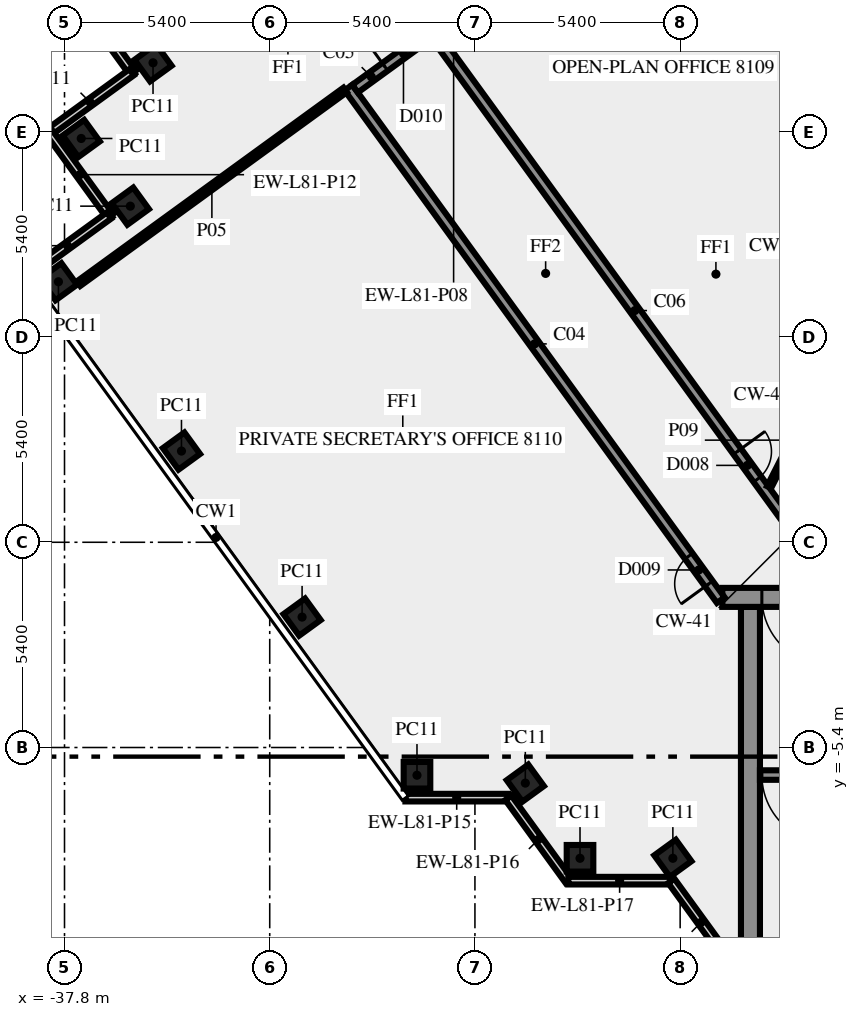
"""IFC4 building model, lengths in metres.
Left out: names, types, materials, properties, quantities, classifications, styles, units other than length and angle.
Written with IfcOpenShell. Run it as: python <this file> out.ifc"""

import sys

from ifc_helpers import new_model, si_unit, direction, frame, frame_2d, origin, origin_2d, place, context, subcontext, project, spatial, rectangle, extrude, element, fill, save


model = new_model("IFC4")
c1 = context("Model", 3, precision=1e-05, world=origin(), true_north=direction((0.0, 1.0)))
c2 = subcontext(c1, "Body", "Model", "MODEL_VIEW")
j1 = project(units=[si_unit("LENGTHUNIT", "METRE"), si_unit("PLANEANGLEUNIT", "RADIAN")], contexts=[c1])
p1 = place(None, origin())
s1 = spatial("IfcSite", under=j1, at=p1, CompositionType="ELEMENT")
p2 = place(p1, origin())
s2 = spatial("IfcBuilding", under=s1, at=p2, CompositionType="ELEMENT")
p3 = place(p2, frame((0.0, 0.0, 347.0)))
s3 = spatial("IfcBuildingStorey", under=s2, at=p3, CompositionType="ELEMENT", Elevation=347.0)
for number, where, z_axis, x_axis in (
    (1, (-35.471, 12.616, 0.0), (0.0, 0.0, 1.0), (-0.809, -0.588, 0.0)),
    (2, (-37.36, 10.625, 0.0), (0.0, 0.0, 1.0), (0.588, -0.809, 0.0)),
    (3, (-36.068, 8.844, 0.0), (0.0, 0.0, 1.0), (0.588, -0.809, 0.0)),
    (4, (-37.96, 6.855, 0.0), (0.0, 0.0, 1.0), (0.588, -0.809, 0.0)),
    (5, (-34.722, 2.4, 0.0), (0.0, 0.0, 1.0), (0.588, -0.809, 0.0)),
    (6, (-31.548, -1.969, 0.0), (0.0, 0.0, 1.0), (0.588, -0.809, 0.0)),
    (7, (-28.525, -6.13, 0.0), (0.0, 0.0, 1.0), (1.0, 0.0, 0.0)),
    (8, (-25.674, -6.337, 0.0), (0.0, 0.0, 1.0), (0.588, -0.809, 0.0)),
    (9, (-24.235, -8.315, 0.0), (0.0, 0.0, 1.0), (1.0, 0.0, 0.0)),
    (10, (-21.792, -8.315, 0.0), (0.0, 0.0, 1.0), (0.588, -0.809, 0.0)),
):
    element("IfcColumn", number, at=place(p3, frame(where, z_axis=z_axis, x_axis=x_axis)), inside=s3, PredefinedType="COLUMN", context=c2, shape_type="SweptSolid", body=[
        extrude(rectangle(XDim=0.7, YDim=0.7, at=origin_2d()), origin(), (0.0, 0.0, 1.0), 3.65),
    ])
for number, where, z_axis, x_axis in (
    (11, (-37.592, 14.536, 0.0), (0.0, 0.0, 1.0), (0.588, -0.809, 0.0)),
    (12, (-36.032, 12.369, 0.0), (0.0, 0.0, 1.0), (-0.809, -0.588, 0.0)),
    (13, (-38.189, 10.765, 0.0), (0.0, 0.0, 1.0), (0.588, -0.809, 0.0)),
    (14, (-36.629, 8.597, 0.0), (0.0, 0.0, 1.0), (-0.809, -0.588, 0.0)),
    (15, (-28.83, -6.719, 0.0), (0.0, 0.0, 1.0), (1.0, 0.0, 0.0)),
):
    element("IfcWall", number, at=place(p3, frame(where, z_axis=z_axis, x_axis=x_axis)), inside=s3, PredefinedType="SOLIDWALL", context=c2, shape_type="SweptSolid", body=[
        extrude(rectangle(XDim=2.7, YDim=0.2, at=frame_2d((1.35, 0.0))), origin(), (0.0, 0.0, 1.0), 3.65),
    ])
p4 = place(p3, frame((-26.12, -6.724, 0.0), z_axis=(0.0, 0.0, 1.0), x_axis=(0.587720002413, -0.809064397168, 0.0)))
e16 = element("IfcWall", 16, at=p4, inside=s3, PredefinedType="SOLIDWALL", context=c2, shape_type="SweptSolid", body=[
    extrude(rectangle(XDim=2.7, YDim=0.2, at=frame_2d((1.35, 0.0))), origin(), (0.0, 0.0, 1.0), 3.65),
])
p5 = place(p3, frame((-24.543, -8.904, 0.0), z_axis=(0.0, 0.0, 1.0), x_axis=(1.0, 0.0, 0.0)))
e17 = element("IfcWall", 17, at=p5, inside=s3, PredefinedType="SOLIDWALL", context=c2, shape_type="SweptSolid", body=[
    extrude(rectangle(XDim=2.7, YDim=0.2, at=frame_2d((1.35, 0.0))), origin(), (0.0, 0.0, 1.0), 3.65),
])
p6 = place(p3, frame((-21.833, -8.909, 0.0), z_axis=(0.0, 0.0, 1.0), x_axis=(0.587766567315, -0.809030569476, 0.0)))
e18 = element("IfcWall", 18, at=p6, inside=s3, PredefinedType="SOLIDWALL", context=c2, shape_type="SweptSolid", body=[
    extrude(rectangle(XDim=2.688, YDim=0.2, at=frame_2d((1.344, 0.0))), origin(), (0.0, 0.0, 1.0), 3.65),
])
p7 = place(p3, frame((-19.75, -10.5, 0.0), z_axis=(0.0, 0.0, 1.0), x_axis=(0.0, 1.0, 0.0)))
e19 = element("IfcWall", 19, at=p7, inside=s3, PredefinedType="SHEAR", context=c2, shape_type="SweptSolid", body=[
    extrude(rectangle(XDim=8.8, YDim=0.5, at=frame_2d((4.4, 0.0))), origin(), (0.0, 0.0, 1.0), 3.65),
])
p8 = place(p3, frame((-11.45, -6.125, 0.0), z_axis=(0.0, 0.0, 1.0), x_axis=(-1.0, 0.0, 0.0)))
e20 = element("IfcWall", 20, at=p8, inside=s3, PredefinedType="SHEAR", context=c2, shape_type="SweptSolid", body=[
    extrude(rectangle(XDim=8.05, YDim=0.25, at=frame_2d((4.025, 0.0))), origin(), (0.0, 0.0, 1.0), 3.65),
])
p9 = place(p8, frame((6.2, 0.0, 0.0)))
e21 = element("IfcOpeningElement", 21, at=p9, cuts=e20, PredefinedType="OPENING", context=c2, shape_type="SweptSolid", body=[
    extrude(rectangle(XDim=1.8, YDim=2.1, at=frame_2d((0.9, 1.05))), frame((0.0, 0.135, 0.0), z_axis=(0.0, -1.0, 0.0), x_axis=(1.0, 0.0, 0.0)), (0.0, 0.0, 1.0), 0.27),
])
p10 = place(p3, frame((20.49, -1.45, 0.0), z_axis=(0.0, 0.0, 1.0), x_axis=(-1.0, 0.0, 0.0)))
e22 = element("IfcWall", 22, at=p10, inside=s3, PredefinedType="SHEAR", context=c2, shape_type="SweptSolid", body=[
    extrude(rectangle(XDim=40.98, YDim=0.5, at=frame_2d((20.49, 0.0))), origin(), (0.0, 0.0, 1.0), 3.65),
])
p11 = place(p10, frame((38.14, 0.0, 0.0)))
e23 = element("IfcOpeningElement", 23, at=p11, cuts=e22, PredefinedType="OPENING", context=c2, shape_type="SweptSolid", body=[
    extrude(rectangle(XDim=1.8, YDim=2.1, at=frame_2d((0.9, 1.05))), frame((0.0, 0.26, 0.0), z_axis=(0.0, -1.0, 0.0), x_axis=(1.0, 0.0, 0.0)), (0.0, 0.0, 1.0), 0.52),
])
p12 = place(p10, frame((36.728, 0.0, 0.0)))
e24 = element("IfcOpeningElement", 24, at=p12, cuts=e22, PredefinedType="OPENING", context=c2, shape_type="SweptSolid", body=[
    extrude(rectangle(XDim=0.8, YDim=2.1, at=frame_2d((0.4, 1.05))), frame((0.0, 0.26, 0.0), z_axis=(0.0, -1.0, 0.0), x_axis=(1.0, 0.0, 0.0)), (0.0, 0.0, 1.0), 0.52),
])
p13 = place(p10, frame((35.153, 0.0, 0.0)))
e25 = element("IfcOpeningElement", 25, at=p13, cuts=e22, PredefinedType="OPENING", context=c2, shape_type="SweptSolid", body=[
    extrude(rectangle(XDim=0.8, YDim=2.1, at=frame_2d((0.4, 1.05))), frame((0.0, 0.26, 0.0), z_axis=(0.0, -1.0, 0.0), x_axis=(1.0, 0.0, 0.0)), (0.0, 0.0, 1.0), 0.52),
])
p14 = place(p10, frame((32.94, 0.0, 0.0)))
e26 = element("IfcOpeningElement", 26, at=p14, cuts=e22, PredefinedType="OPENING", context=c2, shape_type="SweptSolid", body=[
    extrude(rectangle(XDim=0.9, YDim=2.1, at=frame_2d((0.45, 1.05))), frame((0.0, 0.26, 0.0), z_axis=(0.0, -1.0, 0.0), x_axis=(1.0, 0.0, 0.0)), (0.0, 0.0, 1.0), 0.52),
])
p15 = place(p10, frame((31.015, 0.0, 0.0)))
e27 = element("IfcOpeningElement", 27, at=p15, cuts=e22, PredefinedType="OPENING", context=c2, shape_type="SweptSolid", body=[
    extrude(rectangle(XDim=0.8, YDim=2.1, at=frame_2d((0.4, 1.05))), frame((0.0, 0.26, 0.0), z_axis=(0.0, -1.0, 0.0), x_axis=(1.0, 0.0, 0.0)), (0.0, 0.0, 1.0), 0.52),
])
p16 = place(p10, frame((24.765, 0.0, 0.0)))
e28 = element("IfcOpeningElement", 28, at=p16, cuts=e22, PredefinedType="OPENING", context=c2, shape_type="SweptSolid", body=[
    extrude(rectangle(XDim=0.8, YDim=2.1, at=frame_2d((0.4, 1.05))), frame((0.0, 0.26, 0.0), z_axis=(0.0, -1.0, 0.0), x_axis=(1.0, 0.0, 0.0)), (0.0, 0.0, 1.0), 0.52),
])
p17 = place(p10, frame((21.765, 0.0, 0.0)))
e29 = element("IfcOpeningElement", 29, at=p17, cuts=e22, PredefinedType="OPENING", context=c2, shape_type="SweptSolid", body=[
    extrude(rectangle(XDim=2.0, YDim=2.1, at=frame_2d((1.0, 1.05))), frame((0.0, 0.26, 0.0), z_axis=(0.0, -1.0, 0.0), x_axis=(1.0, 0.0, 0.0)), (0.0, 0.0, 1.0), 0.52),
])
p18 = place(p10, frame((14.002, 0.0, 0.0)))
e30 = element("IfcOpeningElement", 30, at=p18, cuts=e22, PredefinedType="OPENING", context=c2, shape_type="SweptSolid", body=[
    extrude(rectangle(XDim=0.9, YDim=2.1, at=frame_2d((0.45, 1.05))), frame((0.0, 0.26, 0.0), z_axis=(0.0, -1.0, 0.0), x_axis=(1.0, 0.0, 0.0)), (0.0, 0.0, 1.0), 0.52),
])
p19 = place(p10, frame((10.278, 0.0, 0.0)))
e31 = element("IfcOpeningElement", 31, at=p19, cuts=e22, PredefinedType="OPENING", context=c2, shape_type="SweptSolid", body=[
    extrude(rectangle(XDim=0.9, YDim=2.1, at=frame_2d((0.45, 1.05))), frame((0.0, 0.26, 0.0), z_axis=(0.0, -1.0, 0.0), x_axis=(1.0, 0.0, 0.0)), (0.0, 0.0, 1.0), 0.52),
])
p20 = place(p10, frame((7.14, 0.0, 0.0)))
e32 = element("IfcOpeningElement", 32, at=p20, cuts=e22, PredefinedType="OPENING", context=c2, shape_type="SweptSolid", body=[
    extrude(rectangle(XDim=0.9, YDim=2.1, at=frame_2d((0.45, 1.05))), frame((0.0, 0.26, 0.0), z_axis=(0.0, -1.0, 0.0), x_axis=(1.0, 0.0, 0.0)), (0.0, 0.0, 1.0), 0.52),
])
p21 = place(p10, frame((4.19, 0.0, 0.0)))
e33 = element("IfcOpeningElement", 33, at=p21, cuts=e22, PredefinedType="OPENING", context=c2, shape_type="SweptSolid", body=[
    extrude(rectangle(XDim=0.9, YDim=2.1, at=frame_2d((0.45, 1.05))), frame((0.0, 0.26, 0.0), z_axis=(0.0, -1.0, 0.0), x_axis=(1.0, 0.0, 0.0)), (0.0, 0.0, 1.0), 0.52),
])
p22 = place(p10, frame((1.04, 0.0, 0.0)))
e34 = element("IfcOpeningElement", 34, at=p22, cuts=e22, PredefinedType="OPENING", context=c2, shape_type="SweptSolid", body=[
    extrude(rectangle(XDim=1.8, YDim=2.1, at=frame_2d((0.9, 1.05))), frame((0.0, 0.26, 0.0), z_axis=(0.0, -1.0, 0.0), x_axis=(1.0, 0.0, 0.0)), (0.0, 0.0, 1.0), 0.52),
])
p23 = place(p3, frame((-20.531, -1.523, 0.0), z_axis=(0.0, 0.0, 1.0), x_axis=(-0.587785867777, 0.809016547199, 0.0)))
e35 = element("IfcWall", 35, at=p23, inside=s3, PredefinedType="SOLIDWALL", context=c2, shape_type="SweptSolid", body=[
    extrude(rectangle(XDim=16.67, YDim=0.25, at=frame_2d((8.335, 0.0))), origin(), (0.0, 0.0, 1.0), 3.65),
])
p24 = place(p23, frame((0.533, 0.0, 0.0)))
e36 = element("IfcOpeningElement", 36, at=p24, cuts=e35, PredefinedType="OPENING", context=c2, shape_type="SweptSolid", body=[
    extrude(rectangle(XDim=0.9, YDim=2.1, at=frame_2d((0.45, 1.05))), frame((0.0, 0.135, 0.0), z_axis=(0.0, -1.0, 0.0), x_axis=(1.0, 0.0, 0.0)), (0.0, 0.0, 1.0), 0.27),
])
p25 = place(p3, frame((-30.155, 11.936, 0.0), z_axis=(0.0, 0.0, 1.0), x_axis=(0.809038743598, 0.587755315891, 0.0)))
e37 = element("IfcWall", 37, at=p25, inside=s3, PredefinedType="SOLIDWALL", context=c2, shape_type="SweptSolid", body=[
    extrude(rectangle(XDim=2.65, YDim=0.25, at=frame_2d((1.325, 0.0))), origin(), (0.0, 0.0, 1.0), 3.65),
])
p26 = place(p25, frame((0.976, 0.0, 0.0)))
e38 = element("IfcOpeningElement", 38, at=p26, cuts=e37, PredefinedType="OPENING", context=c2, shape_type="SweptSolid", body=[
    extrude(rectangle(XDim=1.2, YDim=2.1, at=frame_2d((0.6, 1.05))), frame((0.0, 0.135, 0.0), z_axis=(0.0, -1.0, 0.0), x_axis=(1.0, 0.0, 0.0)), (0.0, 0.0, 1.0), 0.27),
])
p27 = place(p3, frame((-28.039, 13.319, 0.0), z_axis=(0.0, 0.0, 1.0), x_axis=(0.587791911753, -0.809012155952, 0.0)))
e39 = element("IfcWall", 39, at=p27, inside=s3, PredefinedType="SOLIDWALL", context=c2, shape_type="SweptSolid", body=[
    extrude(rectangle(XDim=17.853, YDim=0.25, at=frame_2d((8.927, 0.0))), origin(), (0.0, 0.0, 1.0), 3.65),
])
p28 = place(p27, frame((13.512, 0.0, 0.0)))
e40 = element("IfcOpeningElement", 40, at=p28, cuts=e39, PredefinedType="OPENING", context=c2, shape_type="SweptSolid", body=[
    extrude(rectangle(XDim=0.9, YDim=2.1, at=frame_2d((0.45, 1.05))), frame((0.0, 0.135, 0.0), z_axis=(0.0, -1.0, 0.0), x_axis=(1.0, 0.0, 0.0)), (0.0, 0.0, 1.0), 0.27),
])
p29 = place(p3, frame((-37.429, 6.805, 0.0), z_axis=(0.0, 0.0, 1.0), x_axis=(0.809020922653, 0.587779845444, 0.0)))
e41 = element("IfcWall", 41, at=p29, inside=s3, PredefinedType="PARTITIONING", context=c2, shape_type="SweptSolid", body=[
    extrude(rectangle(XDim=8.67, YDim=0.15, at=frame_2d((4.335, 0.0))), origin(), (0.0, 0.0, 1.0), 3.65),
])
p30 = place(p3, frame((-19.261, 1.45, 0.0), z_axis=(0.0, 0.0, 1.0), x_axis=(0.453950796792, 0.891026752736, 0.0)))
e42 = element("IfcWall", 42, at=p30, inside=s3, PredefinedType="PARTITIONING", context=c2, shape_type="SweptSolid", body=[
    extrude(rectangle(XDim=2.778, YDim=0.12, at=frame_2d((1.389, 0.0))), origin(), (0.0, 0.0, 1.0), 3.65),
])
p31 = place(p9, origin())
e43 = element("IfcDoor", 43, at=p31, inside=s3, OperationType="DOUBLE_DOOR_SINGLE_SWING", PredefinedType="DOOR", context=c2, shape_type="SweptSolid", body=[
    extrude(rectangle(XDim=1.8, YDim=2.1, at=frame_2d((0.9, 1.05))), frame((0.0, 0.025, 0.0), z_axis=(0.0, -1.0, 0.0), x_axis=(1.0, 0.0, 0.0)), (0.0, 0.0, 1.0), 0.05),
])
fill(e21, e43)
p32 = place(p11, origin())
e44 = element("IfcDoor", 44, at=p32, inside=s3, OperationType="DOUBLE_DOOR_SINGLE_SWING", PredefinedType="DOOR", context=c2, shape_type="SweptSolid", body=[
    extrude(rectangle(XDim=1.8, YDim=2.1, at=frame_2d((0.9, 1.05))), frame((0.0, 0.025, 0.0), z_axis=(0.0, -1.0, 0.0), x_axis=(1.0, 0.0, 0.0)), (0.0, 0.0, 1.0), 0.05),
])
fill(e23, e44)
p33 = place(p28, origin())
e45 = element("IfcDoor", 45, at=p33, inside=s3, OperationType="SINGLE_SWING_RIGHT", PredefinedType="DOOR", context=c2, shape_type="SweptSolid", body=[
    extrude(rectangle(XDim=0.9, YDim=2.1, at=frame_2d((0.45, 1.05))), frame((0.0, 0.025, 0.0), z_axis=(0.0, -1.0, 0.0), x_axis=(1.0, 0.0, 0.0)), (0.0, 0.0, 1.0), 0.05),
])
fill(e40, e45)
p34 = place(p26, origin())
e46 = element("IfcDoor", 46, at=p34, inside=s3, OperationType="SINGLE_SWING_RIGHT", PredefinedType="DOOR", context=c2, shape_type="SweptSolid", body=[
    extrude(rectangle(XDim=1.2, YDim=2.1, at=frame_2d((0.6, 1.05))), frame((0.0, 0.025, 0.0), z_axis=(0.0, -1.0, 0.0), x_axis=(1.0, 0.0, 0.0)), (0.0, 0.0, 1.0), 0.05),
])
fill(e38, e46)
p35 = place(p24, origin())
e47 = element("IfcDoor", 47, at=p35, inside=s3, OperationType="SINGLE_SWING_LEFT", PredefinedType="DOOR", context=c2, shape_type="SweptSolid", body=[
    extrude(rectangle(XDim=0.9, YDim=2.1, at=frame_2d((0.45, 1.05))), frame((0.0, 0.025, 0.0), z_axis=(0.0, -1.0, 0.0), x_axis=(1.0, 0.0, 0.0)), (0.0, 0.0, 1.0), 0.05),
])
fill(e36, e47)
save(model, sys.argv[1])
